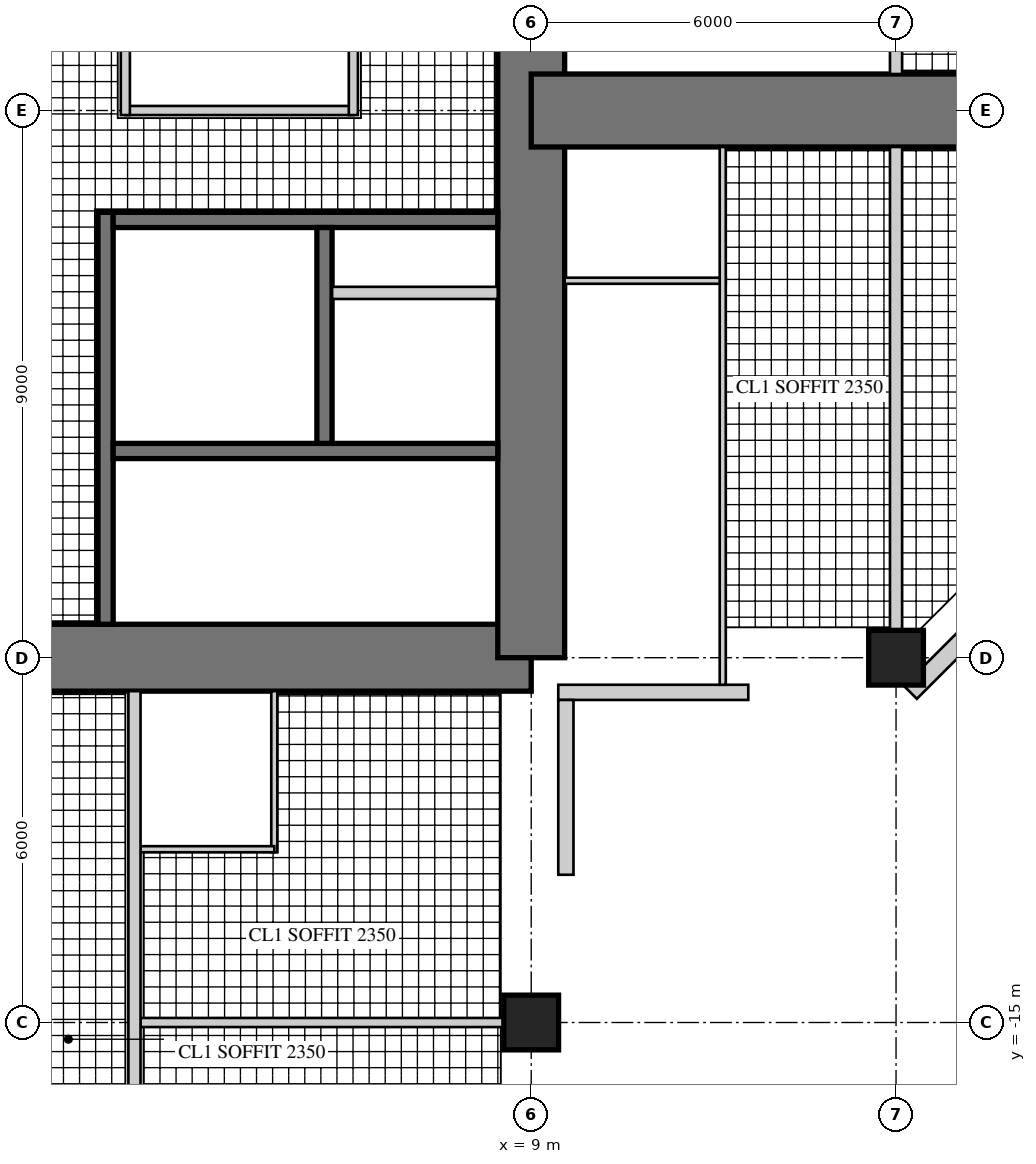
"""IFC4 building model, lengths in metres.
Left out: names, types, materials, properties, quantities, classifications, styles, units other than length and angle.
Written with IfcOpenShell. Run it as: python <this file> out.ifc"""

import sys

from ifc_helpers import new_model, si_unit, direction, frame, frame_2d, origin, origin_2d, place, context, subcontext, project, spatial, rectangle, hollow_rectangle, extrude, element, fill, save


model = new_model("IFC4")
c1 = context("Model", 3, precision=1e-05, world=origin(), true_north=direction((0.0, 1.0)))
c2 = subcontext(c1, "Body", "Model", "MODEL_VIEW")
j1 = project(units=[si_unit("LENGTHUNIT", "METRE"), si_unit("PLANEANGLEUNIT", "RADIAN")], contexts=[c1])
p1 = place(None, origin())
s1 = spatial("IfcSite", under=j1, at=p1, CompositionType="ELEMENT")
p2 = place(p1, origin())
s2 = spatial("IfcBuilding", under=s1, at=p2, CompositionType="ELEMENT")
p3 = place(p2, frame((0.0, 0.0, 179.7)))
s3 = spatial("IfcBuildingStorey", under=s2, at=p3, CompositionType="ELEMENT", Elevation=179.7)
p4 = place(p3, frame((-9.0, -9.0, 0.0), z_axis=(0.0, 0.0, 1.0), x_axis=(1.0, 0.0, 0.0)))
e1 = element("IfcWall", 1, at=p4, inside=s3, PredefinedType="SHEAR", context=c2, shape_type="SweptSolid", body=[
    extrude(rectangle(XDim=18.0, YDim=1.1, at=frame_2d((9.0, 0.0))), origin(), (0.0, 0.0, 1.0), 3.4),
])
p5 = place(p4, frame((9.8, 0.0, 0.0)))
e2 = element("IfcOpeningElement", 2, at=p5, cuts=e1, PredefinedType="OPENING", context=c2, shape_type="SweptSolid", body=[
    extrude(rectangle(XDim=1.0, YDim=2.4, at=frame_2d((0.5, 1.2))), frame((0.0, 0.56, 0.0), z_axis=(0.0, -1.0, 0.0), x_axis=(1.0, 0.0, 0.0)), (0.0, 0.0, 1.0), 1.12),
])
p6 = place(p3, frame((9.0, -9.0, 0.0), z_axis=(0.0, 0.0, 1.0), x_axis=(0.0, 1.0, 0.0)))
e3 = element("IfcWall", 3, at=p6, inside=s3, PredefinedType="SHEAR", context=c2, shape_type="SweptSolid", body=[
    extrude(rectangle(XDim=18.0, YDim=1.1, at=frame_2d((9.0, 0.0))), origin(), (0.0, 0.0, 1.0), 3.4),
])
p7 = place(p6, frame((9.8, 0.0, 0.0)))
e4 = element("IfcOpeningElement", 4, at=p7, cuts=e3, PredefinedType="OPENING", context=c2, shape_type="SweptSolid", body=[
    extrude(rectangle(XDim=1.0, YDim=2.4, at=frame_2d((0.5, 1.2))), frame((0.0, 0.56, 0.0), z_axis=(0.0, -1.0, 0.0), x_axis=(1.0, 0.0, 0.0)), (0.0, 0.0, 1.0), 1.12),
])
p8 = place(p3, frame((2.0, -1.675, 0.0), z_axis=(0.0, 0.0, 1.0), x_axis=(0.0, -1.0, 0.0)))
e5 = element("IfcWall", 5, at=p8, inside=s3, PredefinedType="SHEAR", context=c2, shape_type="SweptSolid", body=[
    extrude(rectangle(XDim=6.775, YDim=0.25, at=frame_2d((3.387, 0.0))), origin(), (0.0, 0.0, 1.0), 3.4),
])
p9 = place(p8, frame((0.725, 0.0, 0.0)))
e6 = element("IfcOpeningElement", 6, at=p9, cuts=e5, PredefinedType="OPENING", context=c2, shape_type="SweptSolid", body=[
    extrude(rectangle(XDim=1.0, YDim=2.1, at=frame_2d((0.5, 1.05))), frame((0.0, 0.135, 0.0), z_axis=(0.0, -1.0, 0.0), x_axis=(1.0, 0.0, 0.0)), (0.0, 0.0, 1.0), 0.27),
])
p10 = place(p3, frame((2.125, -1.8, 0.0), z_axis=(0.0, 0.0, 1.0), x_axis=(1.0, 0.0, 0.0)))
e7 = element("IfcWall", 7, at=p10, inside=s3, PredefinedType="SHEAR", context=c2, shape_type="SweptSolid", body=[
    extrude(rectangle(XDim=6.325, YDim=0.25, at=frame_2d((3.163, 0.0))), origin(), (0.0, 0.0, 1.0), 3.4),
])
p11 = place(p3, frame((2.125, -5.6, 0.0), z_axis=(0.0, 0.0, 1.0), x_axis=(1.0, 0.0, 0.0)))
e8 = element("IfcWall", 8, at=p11, inside=s3, PredefinedType="SHEAR", context=c2, shape_type="SweptSolid", body=[
    extrude(rectangle(XDim=6.325, YDim=0.25, at=frame_2d((3.163, 0.0))), origin(), (0.0, 0.0, 1.0), 3.4),
])
p12 = place(p11, frame((0.175, 0.0, 0.0)))
e9 = element("IfcOpeningElement", 9, at=p12, cuts=e8, PredefinedType="OPENING", context=c2, shape_type="SweptSolid", body=[
    extrude(rectangle(XDim=1.0, YDim=2.1, at=frame_2d((0.5, 1.05))), frame((0.0, 0.135, 0.0), z_axis=(0.0, -1.0, 0.0), x_axis=(1.0, 0.0, 0.0)), (0.0, 0.0, 1.0), 0.27),
])
p13 = place(p3, frame((5.6, -1.925, 0.0), z_axis=(0.0, 0.0, 1.0), x_axis=(0.0, -1.0, 0.0)))
e10 = element("IfcWall", 10, at=p13, inside=s3, PredefinedType="SHEAR", context=c2, shape_type="SweptSolid", body=[
    extrude(rectangle(XDim=3.55, YDim=0.25, at=frame_2d((1.775, 0.0))), origin(), (0.0, 0.0, 1.0), 3.4),
])
p14 = place(p13, frame((1.525, 0.0, 0.0)))
e11 = element("IfcOpeningElement", 11, at=p14, cuts=e10, PredefinedType="OPENING", context=c2, shape_type="SweptSolid", body=[
    extrude(rectangle(XDim=1.1, YDim=2.2, at=frame_2d((0.55, 1.1))), frame((0.0, 0.135, 0.0), z_axis=(0.0, -1.0, 0.0), x_axis=(1.0, 0.0, 0.0)), (0.0, 0.0, 1.0), 0.27),
])
p15 = place(p13, frame((0.075, 0.0, 0.0)))
e12 = element("IfcOpeningElement", 12, at=p15, cuts=e10, PredefinedType="OPENING", context=c2, shape_type="SweptSolid", body=[
    extrude(rectangle(XDim=0.8, YDim=2.1, at=frame_2d((0.4, 1.05))), frame((0.0, 0.135, 0.0), z_axis=(0.0, -1.0, 0.0), x_axis=(1.0, 0.0, 0.0)), (0.0, 0.0, 1.0), 0.27),
])
p16 = place(p3, frame((5.725, -3.0, 0.0), z_axis=(0.0, 0.0, 1.0), x_axis=(1.0, 0.0, 0.0)))
e13 = element("IfcWall", 13, at=p16, inside=s3, PredefinedType="PARTITIONING", context=c2, shape_type="SweptSolid", body=[
    extrude(rectangle(XDim=2.725, YDim=0.2, at=frame_2d((1.362, 0.0))), origin(), (0.0, 0.0, 1.0), 3.4),
])
p17 = place(p3, frame((9.0, 0.0, 0.0), z_axis=(0.0, 0.0, 1.0), x_axis=(1.0, 0.0, 0.0)))
e14 = element("IfcWall", 14, at=p17, inside=s3, PredefinedType="SHEAR", context=c2, shape_type="SweptSolid", body=[
    extrude(rectangle(XDim=9.0, YDim=1.2, at=frame_2d((4.5, 0.0))), origin(), (0.0, 0.0, 1.0), 3.4),
])
p18 = place(p17, frame((3.95, 0.0, 0.0)))
e15 = element("IfcOpeningElement", 15, at=p18, cuts=e14, PredefinedType="OPENING", context=c2, shape_type="SweptSolid", body=[
    extrude(rectangle(XDim=1.0, YDim=2.15, at=frame_2d((0.5, 1.075))), frame((0.0, 0.61, 0.0), z_axis=(0.0, -1.0, 0.0), x_axis=(1.0, 0.0, 0.0)), (0.0, 0.0, 1.0), 1.22),
])
p19 = place(p17, frame((7.0, 0.0, 0.0)))
e16 = element("IfcOpeningElement", 16, at=p19, cuts=e14, PredefinedType="OPENING", context=c2, shape_type="SweptSolid", body=[
    extrude(rectangle(XDim=1.0, YDim=2.2, at=frame_2d((0.5, 1.1))), frame((0.0, 0.61, 0.0), z_axis=(0.0, -1.0, 0.0), x_axis=(1.0, 0.0, 0.0)), (0.0, 0.0, 1.0), 1.22),
])
for number, where, z_axis, x_axis in (
    (17, (15.0, -9.0, 0.0), (0.0, 0.0, 1.0), (1.0, 0.0, 0.0)),
    (18, (9.0, -15.0, 0.0), (0.0, 0.0, 1.0), (1.0, 0.0, 0.0)),
):
    element("IfcColumn", number, at=place(p3, frame(where, z_axis=z_axis, x_axis=x_axis)), inside=s3, PredefinedType="COLUMN", context=c2, shape_type="SweptSolid", body=[
        extrude(rectangle(XDim=0.9, YDim=0.9, at=origin_2d()), origin(), (0.0, 0.0, 1.0), 3.4),
    ])
p20 = place(p3, frame((9.445, -9.57, 0.0), z_axis=(0.0, 0.0, 1.0), x_axis=(1.0, 0.0, 0.0)))
e19 = element("IfcWall", 19, at=p20, inside=s3, PredefinedType="SOLIDWALL", context=c2, shape_type="SweptSolid", body=[
    extrude(rectangle(XDim=3.125, YDim=0.25, at=frame_2d((1.562, 0.0))), origin(), (0.0, 0.0, 1.0), 3.22),
])
p21 = place(p20, frame((0.6, 0.0, 0.0)))
e20 = element("IfcOpeningElement", 20, at=p21, cuts=e19, PredefinedType="OPENING", context=c2, shape_type="SweptSolid", body=[
    extrude(rectangle(XDim=1.0, YDim=2.2, at=frame_2d((0.5, 1.1))), frame((0.0, 0.135, 0.0), z_axis=(0.0, -1.0, 0.0), x_axis=(1.0, 0.0, 0.0)), (0.0, 0.0, 1.0), 0.27),
])
p22 = place(p3, frame((15.236, -9.57, 0.0), z_axis=(0.0, 0.0, 1.0), x_axis=(0.707106781187, 0.707106781187, 0.0)))
e21 = element("IfcWall", 21, at=p22, inside=s3, PredefinedType="SOLIDWALL", context=c2, shape_type="SweptSolid", body=[
    extrude(rectangle(XDim=4.715, YDim=0.3, at=frame_2d((2.357, 0.0))), origin(), (0.0, 0.0, 1.0), 3.22),
])
p23 = place(p22, frame((1.907, 0.0, 0.3)))
e22 = element("IfcOpeningElement", 22, at=p23, cuts=e21, PredefinedType="OPENING", context=c2, shape_type="SweptSolid", body=[
    extrude(rectangle(XDim=0.9, YDim=2.4, at=frame_2d((0.45, 1.2))), frame((0.0, 0.16, 0.0), z_axis=(0.0, -1.0, 0.0), x_axis=(1.0, 0.0, 0.0)), (0.0, 0.0, 1.0), 0.32),
])
p24 = place(p3, frame((9.57, -12.57, 0.0), z_axis=(0.0, 0.0, 1.0), x_axis=(0.0, 1.0, 0.0)))
e23 = element("IfcWall", 23, at=p24, inside=s3, PredefinedType="SOLIDWALL", context=c2, shape_type="SweptSolid", body=[
    extrude(rectangle(XDim=2.875, YDim=0.25, at=frame_2d((1.438, 0.0))), origin(), (0.0, 0.0, 1.0), 3.22),
])
p25 = place(p24, frame((0.6, 0.0, 0.0)))
e24 = element("IfcOpeningElement", 24, at=p25, cuts=e23, PredefinedType="OPENING", context=c2, shape_type="SweptSolid", body=[
    extrude(rectangle(XDim=1.0, YDim=2.2, at=frame_2d((0.5, 1.1))), frame((0.0, 0.135, 0.0), z_axis=(0.0, -1.0, 0.0), x_axis=(1.0, 0.0, 0.0)), (0.0, 0.0, 1.0), 0.27),
])
p26 = place(p3, frame((2.325, 0.0, 0.0), z_axis=(0.0, 0.0, 1.0), x_axis=(1.0, 0.0, 0.0)))
e25 = element("IfcWall", 25, at=p26, inside=s3, PredefinedType="PARTITIONING", context=c2, shape_type="SweptSolid", body=[
    extrude(rectangle(XDim=3.75, YDim=0.15, at=frame_2d((1.875, 0.0))), origin(), (0.0, 0.0, 1.0), 3.22),
])
p27 = place(p26, frame((0.4, 0.0, 0.0)))
e26 = element("IfcOpeningElement", 26, at=p27, cuts=e25, PredefinedType="OPENING", context=c2, shape_type="SweptSolid", body=[
    extrude(rectangle(XDim=1.0, YDim=2.1, at=frame_2d((0.5, 1.05))), frame((0.0, 0.085, 0.0), z_axis=(0.0, -1.0, 0.0), x_axis=(1.0, 0.0, 0.0)), (0.0, 0.0, 1.0), 0.17),
])
for number, where, z_axis, x_axis in (
    (27, (2.325, 1.875, 0.0), (0.0, 0.0, 1.0), (0.0, -1.0, 0.0)),
    (28, (6.075, -0.075, 0.0), (0.0, 0.0, 1.0), (0.0, 1.0, 0.0)),
):
    element("IfcWall", number, at=place(p3, frame(where, z_axis=z_axis, x_axis=x_axis)), inside=s3, PredefinedType="PARTITIONING", context=c2, shape_type="SweptSolid", body=[
        extrude(rectangle(XDim=1.95, YDim=0.15, at=frame_2d((0.975, 0.0))), origin(), (0.0, 0.0, 1.0), 3.22),
    ])
p28 = place(p3, frame((9.55, -2.8, 0.0), z_axis=(0.0, 0.0, 1.0), x_axis=(1.0, 0.0, 0.0)))
e29 = element("IfcWall", 29, at=p28, inside=s3, PredefinedType="PARTITIONING", context=c2, shape_type="SweptSolid", body=[
    extrude(rectangle(XDim=2.65, YDim=0.1, at=frame_2d((1.325, 0.0))), origin(), (0.0, 0.0, 1.0), 3.22),
])
p29 = place(p3, frame((12.15, -9.445, 0.0), z_axis=(0.0, 0.0, 1.0), x_axis=(0.0, 1.0, 0.0)))
e30 = element("IfcWall", 30, at=p29, inside=s3, PredefinedType="PARTITIONING", context=c2, shape_type="SweptSolid", body=[
    extrude(rectangle(XDim=8.845, YDim=0.1, at=frame_2d((4.422, 0.0))), origin(), (0.0, 0.0, 1.0), 3.22),
])
p30 = place(p29, frame((5.295, 0.0, 0.0)))
e31 = element("IfcOpeningElement", 31, at=p30, cuts=e30, PredefinedType="OPENING", context=c2, shape_type="SweptSolid", body=[
    extrude(rectangle(XDim=0.9, YDim=2.1, at=frame_2d((0.45, 1.05))), frame((0.0, 0.06, 0.0), z_axis=(0.0, -1.0, 0.0), x_axis=(1.0, 0.0, 0.0)), (0.0, 0.0, 1.0), 0.12),
])
p31 = place(p29, frame((7.395, 0.0, 0.0)))
e32 = element("IfcOpeningElement", 32, at=p31, cuts=e30, PredefinedType="OPENING", context=c2, shape_type="SweptSolid", body=[
    extrude(rectangle(XDim=0.9, YDim=2.1, at=frame_2d((0.45, 1.05))), frame((0.0, 0.06, 0.0), z_axis=(0.0, -1.0, 0.0), x_axis=(1.0, 0.0, 0.0)), (0.0, 0.0, 1.0), 0.12),
])
p32 = place(p3, frame((15.0, -8.55, 0.0), z_axis=(0.0, 0.0, 1.0), x_axis=(0.0, 1.0, 0.0)))
e33 = element("IfcWall", 33, at=p32, inside=s3, PredefinedType="SOLIDWALL", context=c2, shape_type="SweptSolid", body=[
    extrude(rectangle(XDim=7.95, YDim=0.2, at=frame_2d((3.975, 0.0))), origin(), (0.0, 0.0, 1.0), 2.47),
])
p33 = place(p3, frame((15.0, 0.6, 0.0), z_axis=(0.0, 0.0, 1.0), x_axis=(0.0, 1.0, 0.0)))
e34 = element("IfcWall", 34, at=p33, inside=s3, PredefinedType="SOLIDWALL", context=c2, shape_type="SweptSolid", body=[
    extrude(rectangle(XDim=7.95, YDim=0.2, at=frame_2d((3.975, 0.0))), origin(), (0.0, 0.0, 1.0), 2.47),
])
p34 = place(p33, frame((0.35, 0.0, 0.0)))
e35 = element("IfcOpeningElement", 35, at=p34, cuts=e34, PredefinedType="OPENING", context=c2, shape_type="SweptSolid", body=[
    extrude(rectangle(XDim=1.0, YDim=2.2, at=frame_2d((0.5, 1.1))), frame((0.0, 0.11, 0.0), z_axis=(0.0, -1.0, 0.0), x_axis=(1.0, 0.0, 0.0)), (0.0, 0.0, 1.0), 0.22),
])
p35 = place(p3, frame((4.775, -9.55, 0.0), z_axis=(0.0, 0.0, 1.0), x_axis=(0.0, -1.0, 0.0)))
e36 = element("IfcWall", 36, at=p35, inside=s3, PredefinedType="PARTITIONING", context=c2, shape_type="SweptSolid", body=[
    extrude(rectangle(XDim=2.65, YDim=0.1, at=frame_2d((1.325, 0.0))), origin(), (0.0, 0.0, 1.0), 3.22),
])
p36 = place(p3, frame((2.575, -12.15, 0.0), z_axis=(0.0, 0.0, 1.0), x_axis=(1.0, 0.0, 0.0)))
e37 = element("IfcWall", 37, at=p36, inside=s3, PredefinedType="PARTITIONING", context=c2, shape_type="SweptSolid", body=[
    extrude(rectangle(XDim=2.2, YDim=0.1, at=frame_2d((1.1, 0.0))), origin(), (0.0, 0.0, 1.0), 3.22),
])
p37 = place(p36, frame((0.55, 0.0, 0.0)))
e38 = element("IfcOpeningElement", 38, at=p37, cuts=e37, PredefinedType="OPENING", context=c2, shape_type="SweptSolid", body=[
    extrude(rectangle(XDim=0.9, YDim=2.1, at=frame_2d((0.45, 1.05))), frame((0.0, 0.06, 0.0), z_axis=(0.0, -1.0, 0.0), x_axis=(1.0, 0.0, 0.0)), (0.0, 0.0, 1.0), 0.12),
])
p38 = place(p3, frame((2.575, -15.0, 0.0), z_axis=(0.0, 0.0, 1.0), x_axis=(1.0, 0.0, 0.0)))
e39 = element("IfcWall", 39, at=p38, inside=s3, PredefinedType="PARTITIONING", context=c2, shape_type="SweptSolid", body=[
    extrude(rectangle(XDim=5.975, YDim=0.15, at=frame_2d((2.988, 0.0))), origin(), (0.0, 0.0, 1.0), 2.47),
])
p39 = place(p38, frame((0.5, 0.0, 0.0)))
e40 = element("IfcOpeningElement", 40, at=p39, cuts=e39, PredefinedType="OPENING", context=c2, shape_type="SweptSolid", body=[
    extrude(rectangle(XDim=1.0, YDim=2.1, at=frame_2d((0.5, 1.05))), frame((0.0, 0.085, 0.0), z_axis=(0.0, -1.0, 0.0), x_axis=(1.0, 0.0, 0.0)), (0.0, 0.0, 1.0), 0.17),
])
p40 = place(p3, frame((2.475, -9.55, 0.0), z_axis=(0.0, 0.0, 1.0), x_axis=(0.0, -1.0, 0.0)))
e41 = element("IfcWall", 41, at=p40, inside=s3, PredefinedType="SOLIDWALL", context=c2, shape_type="SweptSolid", body=[
    extrude(rectangle(XDim=11.45, YDim=0.2, at=frame_2d((5.725, 0.0))), origin(), (0.0, 0.0, 1.0), 3.22),
])
p41 = place(p40, frame((3.4, 0.0, 0.0)))
e42 = element("IfcOpeningElement", 42, at=p41, cuts=e41, PredefinedType="OPENING", context=c2, shape_type="SweptSolid", body=[
    extrude(rectangle(XDim=1.0, YDim=2.15, at=frame_2d((0.5, 1.075))), frame((0.0, 0.11, 0.0), z_axis=(0.0, -1.0, 0.0), x_axis=(1.0, 0.0, 0.0)), (0.0, 0.0, 1.0), 0.22),
])
p42 = place(p21, origin())
e43 = element("IfcDoor", 43, at=p42, inside=s3, OperationType="SINGLE_SWING_LEFT", PredefinedType="DOOR", context=c2, shape_type="SweptSolid", body=[
    extrude(hollow_rectangle(XDim=1.0, YDim=2.2, WallThickness=0.06, at=frame_2d((0.5, 1.1))), frame((0.0, 0.025, 0.0), z_axis=(0.0, -1.0, 0.0), x_axis=(1.0, 0.0, 0.0)), (0.0, 0.0, 1.0), 0.05),
    extrude(rectangle(XDim=0.879, YDim=2.079, at=frame_2d((0.5, 1.1))), frame((0.0, 0.025, 0.0), z_axis=(0.0, -1.0, 0.0), x_axis=(1.0, 0.0, 0.0)), (0.0, 0.0, 1.0), 0.05),
])
fill(e20, e43)
p43 = place(p25, origin())
e44 = element("IfcDoor", 44, at=p43, inside=s3, OperationType="SINGLE_SWING_RIGHT", PredefinedType="DOOR", context=c2, shape_type="SweptSolid", body=[
    extrude(hollow_rectangle(XDim=1.0, YDim=2.2, WallThickness=0.06, at=frame_2d((0.5, 1.1))), frame((0.0, 0.025, 0.0), z_axis=(0.0, -1.0, 0.0), x_axis=(1.0, 0.0, 0.0)), (0.0, 0.0, 1.0), 0.05),
    extrude(rectangle(XDim=0.879, YDim=2.079, at=frame_2d((0.5, 1.1))), frame((0.0, 0.025, 0.0), z_axis=(0.0, -1.0, 0.0), x_axis=(1.0, 0.0, 0.0)), (0.0, 0.0, 1.0), 0.05),
])
fill(e24, e44)
p44 = place(p27, origin())
e45 = element("IfcDoor", 45, at=p44, inside=s3, OperationType="SINGLE_SWING_LEFT", PredefinedType="DOOR", context=c2, shape_type="SweptSolid", body=[
    extrude(rectangle(XDim=1.0, YDim=2.1, at=frame_2d((0.5, 1.05))), frame((0.0, 0.025, 0.0), z_axis=(0.0, -1.0, 0.0), x_axis=(1.0, 0.0, 0.0)), (0.0, 0.0, 1.0), 0.05),
])
fill(e26, e45)
p45 = place(p30, origin())
e46 = element("IfcDoor", 46, at=p45, inside=s3, OperationType="SINGLE_SWING_RIGHT", PredefinedType="DOOR", context=c2, shape_type="SweptSolid", body=[
    extrude(rectangle(XDim=0.9, YDim=2.1, at=frame_2d((0.45, 1.05))), frame((0.0, 0.025, 0.0), z_axis=(0.0, -1.0, 0.0), x_axis=(1.0, 0.0, 0.0)), (0.0, 0.0, 1.0), 0.05),
])
fill(e31, e46)
p46 = place(p31, origin())
e47 = element("IfcDoor", 47, at=p46, inside=s3, OperationType="SINGLE_SWING_RIGHT", PredefinedType="DOOR", context=c2, shape_type="SweptSolid", body=[
    extrude(rectangle(XDim=0.9, YDim=2.1, at=frame_2d((0.45, 1.05))), frame((0.0, 0.025, 0.0), z_axis=(0.0, -1.0, 0.0), x_axis=(1.0, 0.0, 0.0)), (0.0, 0.0, 1.0), 0.05),
])
fill(e32, e47)
p47 = place(p34, frame((1.0, 0.0, 0.0), z_axis=(0.0, 0.0, 1.0), x_axis=(-1.0, 0.0, 0.0)))
e48 = element("IfcDoor", 48, at=p47, inside=s3, OperationType="SINGLE_SWING_LEFT", PredefinedType="DOOR", context=c2, shape_type="SweptSolid", body=[
    extrude(rectangle(XDim=1.0, YDim=2.2, at=frame_2d((0.5, 1.1))), frame((0.0, 0.025, 0.0), z_axis=(0.0, -1.0, 0.0), x_axis=(1.0, 0.0, 0.0)), (0.0, 0.0, 1.0), 0.05),
])
fill(e35, e48)
p48 = place(p37, origin())
e49 = element("IfcDoor", 49, at=p48, inside=s3, OperationType="SINGLE_SWING_LEFT", PredefinedType="DOOR", context=c2, shape_type="SweptSolid", body=[
    extrude(rectangle(XDim=0.9, YDim=2.1, at=frame_2d((0.45, 1.05))), frame((0.0, 0.025, 0.0), z_axis=(0.0, -1.0, 0.0), x_axis=(1.0, 0.0, 0.0)), (0.0, 0.0, 1.0), 0.05),
])
fill(e38, e49)
p49 = place(p39, origin())
e50 = element("IfcDoor", 50, at=p49, inside=s3, OperationType="SINGLE_SWING_LEFT", PredefinedType="DOOR", context=c2, shape_type="SweptSolid", body=[
    extrude(rectangle(XDim=1.0, YDim=2.1, at=frame_2d((0.5, 1.05))), frame((0.0, 0.025, 0.0), z_axis=(0.0, -1.0, 0.0), x_axis=(1.0, 0.0, 0.0)), (0.0, 0.0, 1.0), 0.05),
])
fill(e40, e50)
p50 = place(p41, origin())
e51 = element("IfcDoor", 51, at=p50, inside=s3, OperationType="SINGLE_SWING_LEFT", PredefinedType="DOOR", context=c2, shape_type="SweptSolid", body=[
    extrude(rectangle(XDim=1.0, YDim=2.15, at=frame_2d((0.5, 1.075))), frame((0.0, 0.025, 0.0), z_axis=(0.0, -1.0, 0.0), x_axis=(1.0, 0.0, 0.0)), (0.0, 0.0, 1.0), 0.05),
])
fill(e42, e51)
p51 = place(p18, frame((1.0, 0.0, 0.0), z_axis=(0.0, 0.0, 1.0), x_axis=(-1.0, 0.0, 0.0)))
e52 = element("IfcDoor", 52, at=p51, inside=s3, OperationType="SINGLE_SWING_RIGHT", PredefinedType="DOOR", context=c2, shape_type="SweptSolid", body=[
    extrude(rectangle(XDim=1.0, YDim=2.15, at=frame_2d((0.5, 1.075))), frame((0.0, 0.025, 0.0), z_axis=(0.0, -1.0, 0.0), x_axis=(1.0, 0.0, 0.0)), (0.0, 0.0, 1.0), 0.05),
])
fill(e15, e52)
p52 = place(p5, origin())
e53 = element("IfcDoor", 53, at=p52, inside=s3, OperationType="SINGLE_SWING_RIGHT", PredefinedType="DOOR", context=c2, shape_type="SweptSolid", body=[
    extrude(rectangle(XDim=1.0, YDim=2.4, at=frame_2d((0.5, 1.2))), frame((0.0, 0.055, 0.0), z_axis=(0.0, -1.0, 0.0), x_axis=(1.0, 0.0, 0.0)), (0.0, 0.0, 1.0), 0.05),
])
fill(e2, e53)
p53 = place(p7, origin())
e54 = element("IfcDoor", 54, at=p53, inside=s3, OperationType="SINGLE_SWING_RIGHT", PredefinedType="DOOR", context=c2, shape_type="SweptSolid", body=[
    extrude(rectangle(XDim=1.0, YDim=2.4, at=frame_2d((0.5, 1.2))), frame((0.0, 0.055, 0.0), z_axis=(0.0, -1.0, 0.0), x_axis=(1.0, 0.0, 0.0)), (0.0, 0.0, 1.0), 0.05),
])
fill(e4, e54)
p54 = place(p9, origin())
e55 = element("IfcDoor", 55, at=p54, inside=s3, OperationType="SINGLE_SWING_LEFT", PredefinedType="DOOR", context=c2, shape_type="SweptSolid", body=[
    extrude(rectangle(XDim=1.0, YDim=2.1, at=frame_2d((0.5, 1.05))), frame((0.0, 0.025, 0.0), z_axis=(0.0, -1.0, 0.0), x_axis=(1.0, 0.0, 0.0)), (0.0, 0.0, 1.0), 0.05),
])
fill(e6, e55)
p55 = place(p12, frame((1.0, 0.0, 0.0), z_axis=(0.0, 0.0, 1.0), x_axis=(-1.0, 0.0, 0.0)))
e56 = element("IfcDoor", 56, at=p55, inside=s3, OperationType="SINGLE_SWING_RIGHT", PredefinedType="DOOR", context=c2, shape_type="SweptSolid", body=[
    extrude(rectangle(XDim=1.0, YDim=2.1, at=frame_2d((0.5, 1.05))), frame((0.0, 0.025, 0.0), z_axis=(0.0, -1.0, 0.0), x_axis=(1.0, 0.0, 0.0)), (0.0, 0.0, 1.0), 0.05),
])
fill(e9, e56)
p56 = place(p14, origin())
e57 = element("IfcDoor", 57, at=p56, inside=s3, OperationType="DOUBLE_DOOR_SLIDING", PredefinedType="DOOR", context=c2, shape_type="SweptSolid", body=[
    extrude(rectangle(XDim=1.1, YDim=2.2, at=frame_2d((0.55, 1.1))), frame((0.0, 0.025, 0.0), z_axis=(0.0, -1.0, 0.0), x_axis=(1.0, 0.0, 0.0)), (0.0, 0.0, 1.0), 0.05),
])
fill(e11, e57)
p57 = place(p15, origin())
e58 = element("IfcDoor", 58, at=p57, inside=s3, OperationType="SINGLE_SWING_LEFT", PredefinedType="DOOR", context=c2, shape_type="SweptSolid", body=[
    extrude(rectangle(XDim=0.8, YDim=2.1, at=frame_2d((0.4, 1.05))), frame((0.0, 0.025, 0.0), z_axis=(0.0, -1.0, 0.0), x_axis=(1.0, 0.0, 0.0)), (0.0, 0.0, 1.0), 0.05),
])
fill(e12, e58)
save(model, sys.argv[1])
